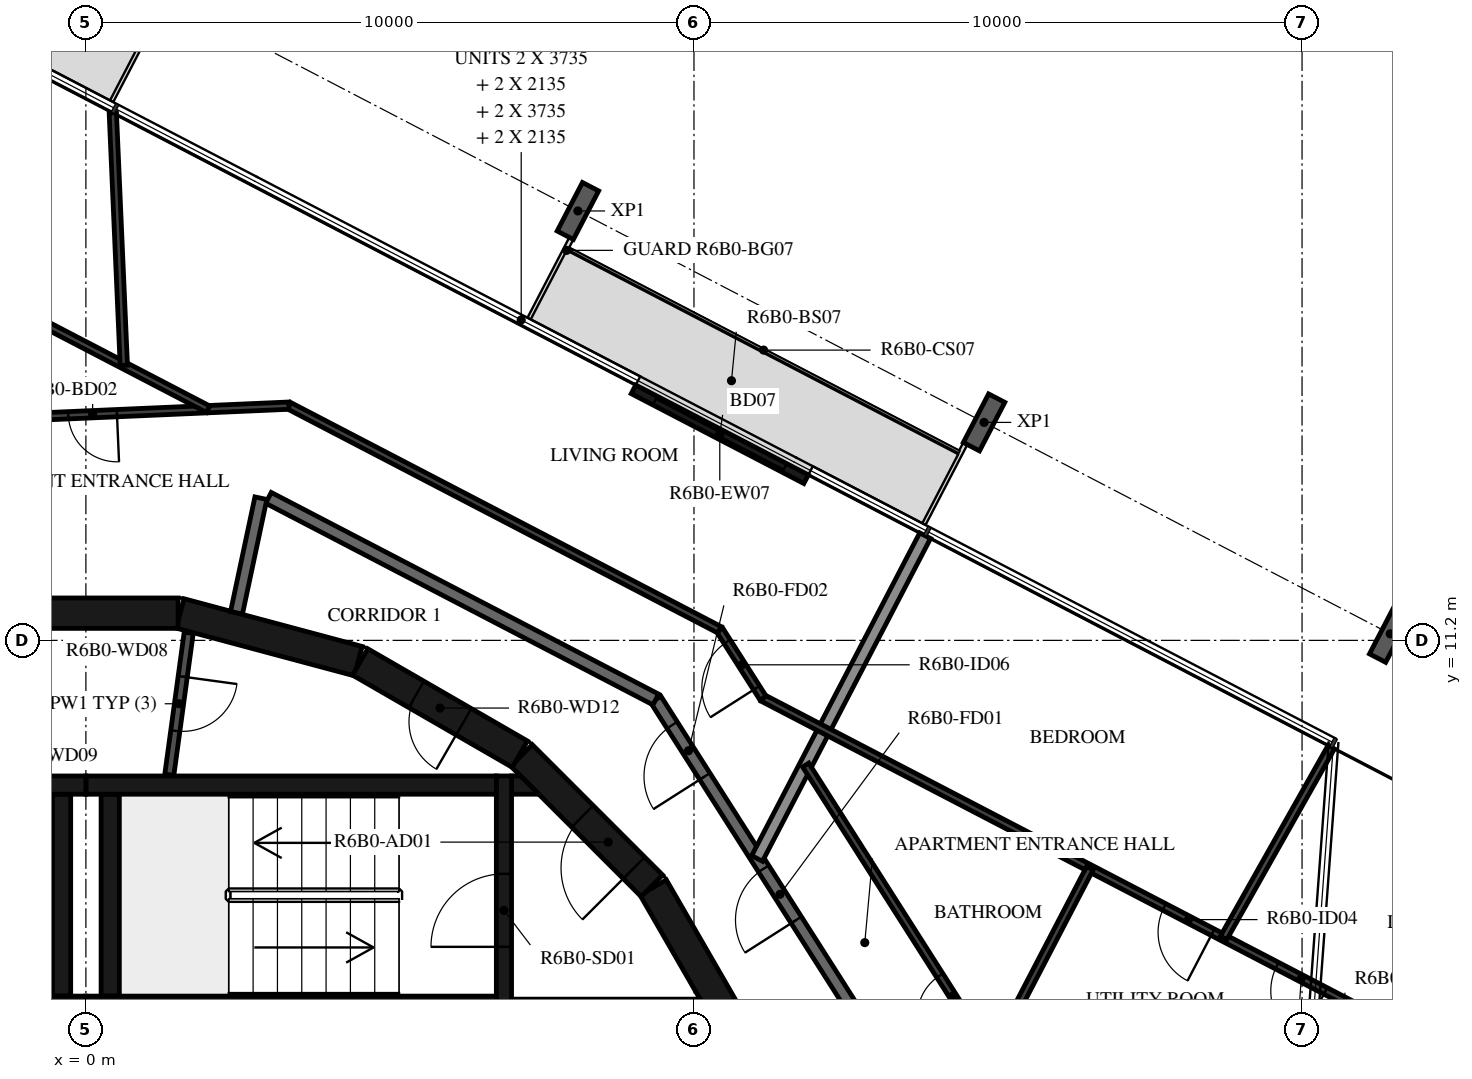
"""IFC4 building model, lengths in metres.
Left out: names, types, materials, properties, quantities, classifications, styles, units other than length and angle.
Written with IfcOpenShell. Run it as: python <this file> out.ifc"""

import sys

from ifc_helpers import new_model, si_unit, direction, frame, frame_2d, origin, origin_2d, place, context, subcontext, project, spatial, polyline, rectangle, i_section, outline, extrude, element, fill, save


model = new_model("IFC4")
c1 = context("Model", 3, precision=1e-05, world=origin(), true_north=direction((0.0, 1.0)))
c2 = subcontext(c1, "Body", "Model", "MODEL_VIEW")
j1 = project(units=[si_unit("LENGTHUNIT", "METRE"), si_unit("PLANEANGLEUNIT", "RADIAN")], contexts=[c1])
p1 = place(None, origin())
s1 = spatial("IfcSite", under=j1, at=p1, CompositionType="ELEMENT")
p2 = place(p1, origin())
s2 = spatial("IfcBuilding", under=s1, at=p2, CompositionType="ELEMENT")
p3 = place(p2, frame((0.0, 0.0, 240.7)))
s3 = spatial("IfcBuildingStorey", under=s2, at=p3, CompositionType="ELEMENT", Elevation=240.7)
for number, where, z_axis, x_axis in (
    (1, (21.45, 11.308, -0.38), (0.0, 0.0, 1.0), (0.887, -0.462, 0.0)),
    (2, (14.771, 14.784, -0.38), (0.0, 0.0, 1.0), (0.887, -0.462, 0.0)),
    (3, (8.091, 18.261, -0.38), (0.0, 0.0, 1.0), (0.887, -0.462, 0.0)),
):
    element("IfcColumn", number, at=place(p3, frame(where, z_axis=z_axis, x_axis=x_axis)), inside=s3, PredefinedType="COLUMN", context=c2, shape_type="SweptSolid", body=[
        extrude(i_section(OverallWidth=0.3, OverallDepth=0.9, WebThickness=0.019, FlangeThickness=0.035, FilletRadius=0.03, at=origin_2d()), origin(), (0.0, 0.0, 1.0), 3.5),
    ])
p4 = place(p3, frame((11.844, 13.851, 0.0), z_axis=(0.0, 0.0, 1.0), x_axis=(-0.887014349583, 0.461741858221, 0.0)))
e4 = element("IfcWall", 4, at=p4, inside=s3, PredefinedType="STANDARD", context=c2, shape_type="SweptSolid", body=[
    extrude(rectangle(XDim=3.2, YDim=0.16, at=frame_2d((1.6, 0.0))), origin(), (0.0, 0.0, 1.0), 3.12),
])
p5 = place(p4, frame((0.4, 0.0, 0.0)))
e5 = element("IfcOpeningElement", 5, at=p5, cuts=e4, PredefinedType="OPENING", context=c2, shape_type="SweptSolid", body=[
    extrude(rectangle(XDim=2.4, YDim=2.4, at=frame_2d((1.2, 1.2))), frame((0.0, 0.09, 0.0), z_axis=(0.0, -1.0, 0.0), x_axis=(1.0, 0.0, 0.0)), (0.0, 0.0, 1.0), 0.18),
])
p6 = place(p3, frame((10.845, 4.51, 0.0), z_axis=(0.0, 0.0, 1.0), x_axis=(-0.500087131594, 0.865975092491, 0.0)))
e6 = element("IfcWall", 6, at=p6, inside=s3, PredefinedType="SHEAR", context=c2, shape_type="SweptSolid", body=[
    extrude(rectangle(XDim=3.033, YDim=0.5, at=frame_2d((1.516, 0.0))), origin(), (0.0, 0.0, 1.0), 3.12),
])
p7 = place(p3, frame((9.308, 7.164, 0.0), z_axis=(0.0, 0.0, 1.0), x_axis=(-0.707106781187, 0.707106781187, 0.0)))
e7 = element("IfcWall", 7, at=p7, inside=s3, PredefinedType="SHEAR", context=c2, shape_type="SweptSolid", body=[
    extrude(rectangle(XDim=3.032, YDim=0.5, at=frame_2d((1.516, 0.0))), origin(), (0.0, 0.0, 1.0), 3.12),
])
p8 = place(p7, frame((0.416, 0.0, 0.0)))
e8 = element("IfcOpeningElement", 8, at=p8, cuts=e7, PredefinedType="OPENING", context=c2, shape_type="SweptSolid", body=[
    extrude(rectangle(XDim=1.2, YDim=2.1, at=frame_2d((0.6, 1.05))), frame((0.0, 0.26, 0.0), z_axis=(0.0, -1.0, 0.0), x_axis=(1.0, 0.0, 0.0)), (0.0, 0.0, 1.0), 0.52),
])
p9 = place(p3, frame((7.137, 9.329, 0.0), z_axis=(0.0, 0.0, 1.0), x_axis=(-0.865975092491, 0.500087131594, 0.0)))
e9 = element("IfcWall", 9, at=p9, inside=s3, PredefinedType="SHEAR", context=c2, shape_type="SweptSolid", body=[
    extrude(rectangle(XDim=3.033, YDim=0.5, at=frame_2d((1.516, 0.0))), origin(), (0.0, 0.0, 1.0), 3.12),
])
p10 = place(p9, frame((1.066, 0.0, 0.0)))
e10 = element("IfcOpeningElement", 10, at=p10, cuts=e9, PredefinedType="OPENING", context=c2, shape_type="SweptSolid", body=[
    extrude(rectangle(XDim=0.9, YDim=2.1, at=frame_2d((0.45, 1.05))), frame((0.0, 0.26, 0.0), z_axis=(0.0, -1.0, 0.0), x_axis=(1.0, 0.0, 0.0)), (0.0, 0.0, 1.0), 0.52),
])
for number, where, z_axis, x_axis in (
    (11, (4.479, 10.858, 0.0), (0.0, 0.0, 1.0), (-0.966, 0.259, 0.0)),
    (12, (1.516, 11.647, 0.0), (0.0, 0.0, 1.0), (-1.0, 0.0, 0.0)),
):
    element("IfcWall", number, at=place(p3, frame(where, z_axis=z_axis, x_axis=x_axis)), inside=s3, PredefinedType="SHEAR", context=c2, shape_type="SweptSolid", body=[
        extrude(rectangle(XDim=3.033, YDim=0.5, at=frame_2d((1.516, 0.0))), origin(), (0.0, 0.0, 1.0), 3.12),
    ])
for number, where, z_axis, x_axis in (
    (13, (0.0, 5.2, 0.0), (0.0, 0.0, 1.0), (1.0, 0.0, 0.0)),
    (14, (0.0, 8.82, 0.0), (0.0, 0.0, 1.0), (1.0, 0.0, 0.0)),
):
    element("IfcWall", number, at=place(p3, frame(where, z_axis=z_axis, x_axis=x_axis)), inside=s3, PredefinedType="SHEAR", context=c2, shape_type="SweptSolid", body=[
        extrude(rectangle(XDim=6.75, YDim=0.3, at=frame_2d((3.375, 0.0))), origin(), (0.0, 0.0, 1.0), 3.12),
    ])
p11 = place(p3, frame((0.4, 5.35, 0.0), z_axis=(0.0, 0.0, 1.0), x_axis=(0.0, 1.0, 0.0)))
e15 = element("IfcWall", 15, at=p11, inside=s3, PredefinedType="SHEAR", context=c2, shape_type="SweptSolid", body=[
    extrude(rectangle(XDim=3.32, YDim=0.3, at=frame_2d((1.66, 0.0))), origin(), (0.0, 0.0, 1.0), 3.12),
])
p12 = place(p3, frame((6.875, 5.05, 0.0), z_axis=(0.0, 0.0, 1.0), x_axis=(0.0, 1.0, 0.0)))
e16 = element("IfcWall", 16, at=p12, inside=s3, PredefinedType="SHEAR", context=c2, shape_type="SweptSolid", body=[
    extrude(rectangle(XDim=3.92, YDim=0.25, at=frame_2d((1.96, 0.0))), origin(), (0.0, 0.0, 1.0), 3.12),
])
p13 = place(p12, frame((1.11, 0.0, 0.0)))
e17 = element("IfcOpeningElement", 17, at=p13, cuts=e16, PredefinedType="OPENING", context=c2, shape_type="SweptSolid", body=[
    extrude(rectangle(XDim=1.2, YDim=2.1, at=frame_2d((0.6, 1.05))), frame((0.0, 0.135, 0.0), z_axis=(0.0, -1.0, 0.0), x_axis=(1.0, 0.0, 0.0)), (0.0, 0.0, 1.0), 0.27),
])
p14 = place(p3, origin())
e18 = element("IfcWall", 18, at=p14, inside=s3, PredefinedType="SHEAR", context=c2, shape_type="SweptSolid", body=[
    extrude(outline(polyline([(7.448, 8.67), (7.0, 8.67), (7.0, 8.97), (7.148, 8.97), (7.448, 8.67)])), origin(), (0.0, 0.0, 1.0), 3.12),
])
for number, where, z_axis, x_axis in (
    (19, (-6.75, 5.2, 0.0), (0.0, 0.0, 1.0), (1.0, 0.0, 0.0)),
    (20, (-6.75, 8.82, 0.0), (0.0, 0.0, 1.0), (1.0, 0.0, 0.0)),
):
    element("IfcWall", number, at=place(p3, frame(where, z_axis=z_axis, x_axis=x_axis)), inside=s3, PredefinedType="SHEAR", context=c2, shape_type="SweptSolid", body=[
        extrude(rectangle(XDim=6.75, YDim=0.3, at=frame_2d((3.375, 0.0))), origin(), (0.0, 0.0, 1.0), 3.12),
    ])
p15 = place(p3, frame((-0.4, 5.35, 0.0), z_axis=(0.0, 0.0, 1.0), x_axis=(0.0, 1.0, 0.0)))
e21 = element("IfcWall", 21, at=p15, inside=s3, PredefinedType="SHEAR", context=c2, shape_type="SweptSolid", body=[
    extrude(rectangle(XDim=3.32, YDim=0.3, at=frame_2d((1.66, 0.0))), origin(), (0.0, 0.0, 1.0), 3.12),
])
p16 = place(p3, frame((1.691, 11.326, 0.0), z_axis=(0.0, 0.0, 1.0), x_axis=(-0.135344253201, -0.990798633994, 0.0)))
e22 = element("IfcWall", 22, at=p16, inside=s3, PredefinedType="PARTITIONING", context=c2, shape_type="SweptSolid", body=[
    extrude(rectangle(XDim=2.358, YDim=0.15, at=frame_2d((1.179, 0.0))), origin(), (0.0, 0.0, 1.0), 3.12),
])
p17 = place(p16, frame((0.729, 0.0, 0.0)))
e23 = element("IfcOpeningElement", 23, at=p17, cuts=e22, PredefinedType="OPENING", context=c2, shape_type="SweptSolid", body=[
    extrude(rectangle(XDim=0.9, YDim=2.1, at=frame_2d((0.45, 1.05))), frame((0.0, 0.085, 0.0), z_axis=(0.0, -1.0, 0.0), x_axis=(1.0, 0.0, 0.0)), (0.0, 0.0, 1.0), 0.17),
])
p18 = place(p3, frame((13.231, 4.172, 0.0), z_axis=(0.0, 0.0, 1.0), x_axis=(-0.537304397561, 0.843388394728, 0.0)))
e24 = element("IfcWall", 24, at=p18, inside=s3, PredefinedType="STANDARD", context=c2, shape_type="SweptSolid", body=[
    extrude(rectangle(XDim=7.181, YDim=0.2, at=frame_2d((3.59, 0.0))), origin(), (0.0, 0.0, 1.0), 3.12),
])
p19 = place(p18, frame((2.881, 0.0, 0.0)))
e25 = element("IfcOpeningElement", 25, at=p19, cuts=e24, PredefinedType="OPENING", context=c2, shape_type="SweptSolid", body=[
    extrude(rectangle(XDim=1.0, YDim=2.1, at=frame_2d((0.5, 1.05))), frame((0.0, 0.11, 0.0), z_axis=(0.0, -1.0, 0.0), x_axis=(1.0, 0.0, 0.0)), (0.0, 0.0, 1.0), 0.22),
])
p20 = place(p18, frame((5.681, 0.0, 0.0)))
e26 = element("IfcOpeningElement", 26, at=p20, cuts=e24, PredefinedType="OPENING", context=c2, shape_type="SweptSolid", body=[
    extrude(rectangle(XDim=1.0, YDim=2.1, at=frame_2d((0.5, 1.05))), frame((0.0, 0.11, 0.0), z_axis=(0.0, -1.0, 0.0), x_axis=(1.0, 0.0, 0.0)), (0.0, 0.0, 1.0), 0.22),
])
p21 = place(p3, frame((9.372, 10.228, 0.0), z_axis=(0.0, 0.0, 1.0), x_axis=(-0.887005184532, 0.461759464021, 0.0)))
e27 = element("IfcWall", 27, at=p21, inside=s3, PredefinedType="STANDARD", context=c2, shape_type="SweptSolid", body=[
    extrude(rectangle(XDim=7.181, YDim=0.2, at=frame_2d((3.591, 0.0))), origin(), (0.0, 0.0, 1.0), 3.12),
])
p22 = place(p3, frame((2.878, 13.538, 0.0), z_axis=(0.0, 0.0, 1.0), x_axis=(-0.207893604596, -0.978151444904, 0.0)))
e28 = element("IfcWall", 28, at=p22, inside=s3, PredefinedType="STANDARD", context=c2, shape_type="SweptSolid", body=[
    extrude(rectangle(XDim=1.927, YDim=0.2, at=frame_2d((0.963, 0.0))), origin(), (0.0, 0.0, 1.0), 3.12),
])
p23 = place(p3, frame((13.801, 12.922, 0.0), z_axis=(0.0, 0.0, 1.0), x_axis=(-0.461726485624, -0.887022351733, 0.0)))
e29 = element("IfcWall", 29, at=p23, inside=s3, PredefinedType="STANDARD", context=c2, shape_type="SweptSolid", body=[
    extrude(rectangle(XDim=5.984, YDim=0.2, at=frame_2d((2.992, 0.0))), origin(), (0.0, 0.0, 1.0), 2.73),
])
p24 = place(p3, frame((14.58, 4.845, 0.0), z_axis=(0.0, 0.0, 1.0), x_axis=(-0.537283960997, 0.84340141407, 0.0)))
e30 = element("IfcWall", 30, at=p24, inside=s3, PredefinedType="PARTITIONING", context=c2, shape_type="SweptSolid", body=[
    extrude(rectangle(XDim=5.104, YDim=0.12, at=frame_2d((2.552, 0.0))), origin(), (0.0, 0.0, 1.0), 3.12),
])
p25 = place(p24, frame((0.2, 0.0, 0.0)))
e31 = element("IfcOpeningElement", 31, at=p25, cuts=e30, PredefinedType="OPENING", context=c2, shape_type="SweptSolid", body=[
    extrude(rectangle(XDim=0.8, YDim=2.1, at=frame_2d((0.4, 1.05))), frame((0.0, 0.07, 0.0), z_axis=(0.0, -1.0, 0.0), x_axis=(1.0, 0.0, 0.0)), (0.0, 0.0, 1.0), 0.14),
])
p26 = place(p3, frame((21.496, 4.858, 0.0), z_axis=(0.0, 0.0, 1.0), x_axis=(-0.887020940825, 0.461729196107, 0.0)))
e32 = element("IfcWall", 32, at=p26, inside=s3, PredefinedType="PARTITIONING", context=c2, shape_type="SweptSolid", body=[
    extrude(rectangle(XDim=11.678, YDim=0.12, at=frame_2d((5.839, 0.0))), origin(), (0.0, 0.0, 1.0), 3.12),
])
p27 = place(p26, frame((1.251, 0.0, 0.0)))
e33 = element("IfcOpeningElement", 33, at=p27, cuts=e32, PredefinedType="OPENING", context=c2, shape_type="SweptSolid", body=[
    extrude(rectangle(XDim=0.9, YDim=2.1, at=frame_2d((0.45, 1.05))), frame((0.0, 0.07, 0.0), z_axis=(0.0, -1.0, 0.0), x_axis=(1.0, 0.0, 0.0)), (0.0, 0.0, 1.0), 0.14),
])
p28 = place(p26, frame((3.341, 0.0, 0.0)))
e34 = element("IfcOpeningElement", 34, at=p28, cuts=e32, PredefinedType="OPENING", context=c2, shape_type="SweptSolid", body=[
    extrude(rectangle(XDim=0.9, YDim=2.1, at=frame_2d((0.45, 1.05))), frame((0.0, 0.07, 0.0), z_axis=(0.0, -1.0, 0.0), x_axis=(1.0, 0.0, 0.0)), (0.0, 0.0, 1.0), 0.14),
])
p29 = place(p3, frame((16.51, 7.453, 0.0), z_axis=(0.0, 0.0, 1.0), x_axis=(-0.461756693023, -0.88700662706, 0.0)))
e35 = element("IfcWall", 35, at=p29, inside=s3, PredefinedType="PARTITIONING", context=c2, shape_type="SweptSolid", body=[
    extrude(rectangle(XDim=2.949, YDim=0.12, at=frame_2d((1.475, 0.0))), origin(), (0.0, 0.0, 1.0), 3.12),
])
p30 = place(p3, frame((20.48, 9.445, 0.0), z_axis=(0.0, 0.0, 1.0), x_axis=(-0.491518927659, -0.870866892098, 0.0)))
e36 = element("IfcWall", 36, at=p30, inside=s3, PredefinedType="PARTITIONING", context=c2, shape_type="SweptSolid", body=[
    extrude(rectangle(XDim=3.602, YDim=0.12, at=frame_2d((1.801, 0.0))), origin(), (0.0, 0.0, 1.0), 2.73),
])
p31 = place(p3, frame((11.137, 10.25, 0.0), z_axis=(0.0, 0.0, 1.0), x_axis=(-0.537231369635, 0.843434914786, 0.0)))
e37 = element("IfcWall", 37, at=p31, inside=s3, PredefinedType="PARTITIONING", context=c2, shape_type="SweptSolid", body=[
    extrude(rectangle(XDim=1.332, YDim=0.12, at=frame_2d((0.666, 0.0))), origin(), (0.0, 0.0, 1.0), 3.12),
])
p32 = place(p31, frame((0.2, 0.0, 0.0)))
e38 = element("IfcOpeningElement", 38, at=p32, cuts=e37, PredefinedType="OPENING", context=c2, shape_type="SweptSolid", body=[
    extrude(rectangle(XDim=0.9, YDim=2.1, at=frame_2d((0.45, 1.05))), frame((0.0, 0.07, 0.0), z_axis=(0.0, -1.0, 0.0), x_axis=(1.0, 0.0, 0.0)), (0.0, 0.0, 1.0), 0.14),
])
p33 = place(p3, frame((10.421, 11.373, 0.0), z_axis=(0.0, 0.0, 1.0), x_axis=(-0.887012970857, 0.461744506769, 0.0)))
e39 = element("IfcWall", 39, at=p33, inside=s3, PredefinedType="PARTITIONING", context=c2, shape_type="SweptSolid", body=[
    extrude(rectangle(XDim=7.985, YDim=0.12, at=frame_2d((3.992, 0.0))), origin(), (0.0, 0.0, 1.0), 3.12),
])
p34 = place(p3, frame((3.339, 15.06, 0.0), z_axis=(0.0, 0.0, 1.0), x_axis=(-0.999047716945, -0.043630943905, 0.0)))
e40 = element("IfcWall", 40, at=p34, inside=s3, PredefinedType="PARTITIONING", context=c2, shape_type="SweptSolid", body=[
    extrude(rectangle(XDim=7.985, YDim=0.12, at=frame_2d((3.992, 0.0))), origin(), (0.0, 0.0, 1.0), 3.12),
])
p35 = place(p34, frame((2.831, 0.0, 0.0)))
e41 = element("IfcOpeningElement", 41, at=p35, cuts=e40, PredefinedType="OPENING", context=c2, shape_type="SweptSolid", body=[
    extrude(rectangle(XDim=0.8, YDim=2.1, at=frame_2d((0.4, 1.05))), frame((0.0, 0.07, 0.0), z_axis=(0.0, -1.0, 0.0), x_axis=(1.0, 0.0, 0.0)), (0.0, 0.0, 1.0), 0.14),
])
p36 = place(p3, frame((-8.35, 20.394, 0.0), z_axis=(0.0, 0.0, 1.0), x_axis=(0.887020940825, -0.461729196107, 0.0)))
e42 = element("IfcWall", 42, at=p36, inside=s3, PredefinedType="PARTITIONING", context=c2, shape_type="SweptSolid", body=[
    extrude(rectangle(XDim=11.678, YDim=0.12, at=frame_2d((5.839, 0.0))), origin(), (0.0, 0.0, 1.0), 3.12),
])
p37 = place(p36, frame((3.469, 0.0, 0.0)))
e43 = element("IfcOpeningElement", 43, at=p37, cuts=e42, PredefinedType="OPENING", context=c2, shape_type="SweptSolid", body=[
    extrude(rectangle(XDim=0.9, YDim=2.1, at=frame_2d((0.45, 1.05))), frame((0.0, 0.07, 0.0), z_axis=(0.0, -1.0, 0.0), x_axis=(1.0, 0.0, 0.0)), (0.0, 0.0, 1.0), 0.14),
])
p38 = place(p3, frame((0.442, 19.876, 0.0), z_axis=(0.0, 0.0, 1.0), x_axis=(0.043638577658, -0.999047383531, 0.0)))
e44 = element("IfcWall", 44, at=p38, inside=s3, PredefinedType="PARTITIONING", context=c2, shape_type="SweptSolid", body=[
    extrude(rectangle(XDim=4.157, YDim=0.12, at=frame_2d((2.078, 0.0))), origin(), (0.0, 0.0, 1.0), 3.12),
])
p39 = place(p5, origin())
e45 = element("IfcDoor", 45, at=p39, inside=s3, OperationType="DOUBLE_DOOR_SLIDING", PredefinedType="DOOR", context=c2, shape_type="SweptSolid", body=[
    extrude(rectangle(XDim=2.4, YDim=2.4, at=frame_2d((1.2, 1.2))), frame((0.0, 0.025, 0.0), z_axis=(0.0, -1.0, 0.0), x_axis=(1.0, 0.0, 0.0)), (0.0, 0.0, 1.0), 0.05),
])
fill(e5, e45)
p40 = place(p13, origin())
e46 = element("IfcDoor", 46, at=p40, inside=s3, OperationType="SINGLE_SWING_LEFT", PredefinedType="DOOR", context=c2, shape_type="SweptSolid", body=[
    extrude(rectangle(XDim=1.2, YDim=2.1, at=frame_2d((0.6, 1.05))), frame((0.0, 0.025, 0.0), z_axis=(0.0, -1.0, 0.0), x_axis=(1.0, 0.0, 0.0)), (0.0, 0.0, 1.0), 0.05),
])
fill(e17, e46)
p41 = place(p8, origin())
e47 = element("IfcDoor", 47, at=p41, inside=s3, OperationType="SINGLE_SWING_RIGHT", PredefinedType="DOOR", context=c2, shape_type="SweptSolid", body=[
    extrude(rectangle(XDim=1.2, YDim=2.1, at=frame_2d((0.6, 1.05))), frame((0.0, 0.025, 0.0), z_axis=(0.0, -1.0, 0.0), x_axis=(1.0, 0.0, 0.0)), (0.0, 0.0, 1.0), 0.05),
])
fill(e8, e47)
p42 = place(p17, origin())
e48 = element("IfcDoor", 48, at=p42, inside=s3, OperationType="SINGLE_SWING_RIGHT", PredefinedType="DOOR", context=c2, shape_type="SweptSolid", body=[
    extrude(rectangle(XDim=0.9, YDim=2.1, at=frame_2d((0.45, 1.05))), frame((0.0, 0.025, 0.0), z_axis=(0.0, -1.0, 0.0), x_axis=(1.0, 0.0, 0.0)), (0.0, 0.0, 1.0), 0.05),
])
fill(e23, e48)
p43 = place(p10, origin())
e49 = element("IfcDoor", 49, at=p43, inside=s3, OperationType="SINGLE_SWING_RIGHT", PredefinedType="DOOR", context=c2, shape_type="SweptSolid", body=[
    extrude(rectangle(XDim=0.9, YDim=2.1, at=frame_2d((0.45, 1.05))), frame((0.0, 0.025, 0.0), z_axis=(0.0, -1.0, 0.0), x_axis=(1.0, 0.0, 0.0)), (0.0, 0.0, 1.0), 0.05),
])
fill(e10, e49)
p44 = place(p19, origin())
e50 = element("IfcDoor", 50, at=p44, inside=s3, OperationType="SINGLE_SWING_LEFT", PredefinedType="DOOR", context=c2, shape_type="SweptSolid", body=[
    extrude(rectangle(XDim=1.0, YDim=2.1, at=frame_2d((0.5, 1.05))), frame((0.0, 0.025, 0.0), z_axis=(0.0, -1.0, 0.0), x_axis=(1.0, 0.0, 0.0)), (0.0, 0.0, 1.0), 0.05),
])
fill(e25, e50)
p45 = place(p25, origin())
e51 = element("IfcDoor", 51, at=p45, inside=s3, OperationType="SINGLE_SWING_LEFT", PredefinedType="DOOR", context=c2, shape_type="SweptSolid", body=[
    extrude(rectangle(XDim=0.8, YDim=2.1, at=frame_2d((0.4, 1.05))), frame((0.0, 0.025, 0.0), z_axis=(0.0, -1.0, 0.0), x_axis=(1.0, 0.0, 0.0)), (0.0, 0.0, 1.0), 0.05),
])
fill(e31, e51)
p46 = place(p27, origin())
e52 = element("IfcDoor", 52, at=p46, inside=s3, OperationType="SINGLE_SWING_LEFT", PredefinedType="DOOR", context=c2, shape_type="SweptSolid", body=[
    extrude(rectangle(XDim=0.9, YDim=2.1, at=frame_2d((0.45, 1.05))), frame((0.0, 0.025, 0.0), z_axis=(0.0, -1.0, 0.0), x_axis=(1.0, 0.0, 0.0)), (0.0, 0.0, 1.0), 0.05),
])
fill(e33, e52)
p47 = place(p28, origin())
e53 = element("IfcDoor", 53, at=p47, inside=s3, OperationType="SINGLE_SWING_LEFT", PredefinedType="DOOR", context=c2, shape_type="SweptSolid", body=[
    extrude(rectangle(XDim=0.9, YDim=2.1, at=frame_2d((0.45, 1.05))), frame((0.0, 0.025, 0.0), z_axis=(0.0, -1.0, 0.0), x_axis=(1.0, 0.0, 0.0)), (0.0, 0.0, 1.0), 0.05),
])
fill(e34, e53)
p48 = place(p20, origin())
e54 = element("IfcDoor", 54, at=p48, inside=s3, OperationType="SINGLE_SWING_LEFT", PredefinedType="DOOR", context=c2, shape_type="SweptSolid", body=[
    extrude(rectangle(XDim=1.0, YDim=2.1, at=frame_2d((0.5, 1.05))), frame((0.0, 0.025, 0.0), z_axis=(0.0, -1.0, 0.0), x_axis=(1.0, 0.0, 0.0)), (0.0, 0.0, 1.0), 0.05),
])
fill(e26, e54)
p49 = place(p32, origin())
e55 = element("IfcDoor", 55, at=p49, inside=s3, OperationType="SINGLE_SWING_LEFT", PredefinedType="DOOR", context=c2, shape_type="SweptSolid", body=[
    extrude(rectangle(XDim=0.9, YDim=2.1, at=frame_2d((0.45, 1.05))), frame((0.0, 0.025, 0.0), z_axis=(0.0, -1.0, 0.0), x_axis=(1.0, 0.0, 0.0)), (0.0, 0.0, 1.0), 0.05),
])
fill(e38, e55)
p50 = place(p35, origin())
e56 = element("IfcDoor", 56, at=p50, inside=s3, OperationType="SINGLE_SWING_RIGHT", PredefinedType="DOOR", context=c2, shape_type="SweptSolid", body=[
    extrude(rectangle(XDim=0.8, YDim=2.1, at=frame_2d((0.4, 1.05))), frame((0.0, 0.025, 0.0), z_axis=(0.0, -1.0, 0.0), x_axis=(1.0, 0.0, 0.0)), (0.0, 0.0, 1.0), 0.05),
])
fill(e41, e56)
save(model, sys.argv[1])
